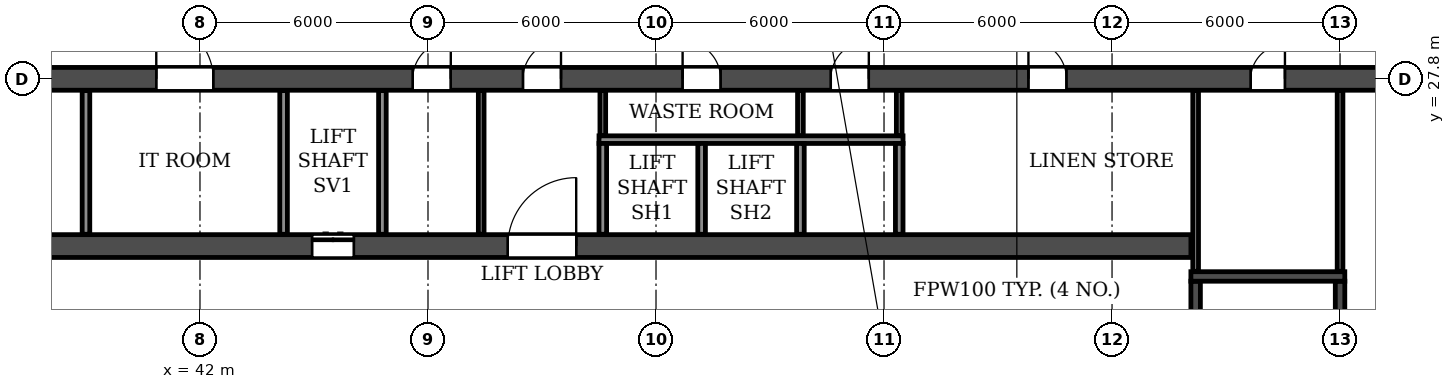
"""IFC4 building model, lengths in metres.
Left out: names, types, materials, properties, quantities, classifications, styles, units other than length and angle.
Written with IfcOpenShell. Run it as: python <this file> out.ifc"""

import sys

from ifc_helpers import new_model, si_unit, direction, frame, frame_2d, origin, place, context, subcontext, project, spatial, rectangle, extrude, element, fill, save


model = new_model("IFC4")
c1 = context("Model", 3, precision=1e-05, world=origin(), true_north=direction((0.0, 1.0)))
c2 = subcontext(c1, "Body", "Model", "MODEL_VIEW")
j1 = project(units=[si_unit("LENGTHUNIT", "METRE"), si_unit("PLANEANGLEUNIT", "RADIAN")], contexts=[c1])
p1 = place(None, origin())
s1 = spatial("IfcSite", under=j1, at=p1, CompositionType="ELEMENT")
p2 = place(p1, origin())
s2 = spatial("IfcBuilding", under=s1, at=p2, CompositionType="ELEMENT")
p3 = place(p2, frame((0.0, 0.0, 43.2)))
s3 = spatial("IfcBuildingStorey", under=s2, at=p3, CompositionType="ELEMENT", Elevation=43.2)
p4 = place(p3, frame((2.6, 27.8, 0.0), z_axis=(0.0, 0.0, 1.0), x_axis=(1.0, 0.0, 0.0)))
e1 = element("IfcWall", 1, at=p4, inside=s3, PredefinedType="SOLIDWALL", context=c2, shape_type="SweptSolid", body=[
    extrude(rectangle(XDim=96.8, YDim=0.6, at=frame_2d((48.4, 0.0))), origin(), (0.0, 0.0, 1.0), 3.05),
])
p5 = place(p4, frame((7.2, 0.0, 0.0)))
e2 = element("IfcOpeningElement", 2, at=p5, cuts=e1, PredefinedType="OPENING", context=c2, shape_type="SweptSolid", body=[
    extrude(rectangle(XDim=1.0, YDim=2.1, at=frame_2d((0.5, 1.05))), frame((0.0, 0.31, 0.0), z_axis=(0.0, -1.0, 0.0), x_axis=(1.0, 0.0, 0.0)), (0.0, 0.0, 1.0), 0.62),
])
p6 = place(p4, frame((16.3, 0.0, 0.0)))
e3 = element("IfcOpeningElement", 3, at=p6, cuts=e1, PredefinedType="OPENING", context=c2, shape_type="SweptSolid", body=[
    extrude(rectangle(XDim=1.0, YDim=2.1, at=frame_2d((0.5, 1.05))), frame((0.0, 0.31, 0.0), z_axis=(0.0, -1.0, 0.0), x_axis=(1.0, 0.0, 0.0)), (0.0, 0.0, 1.0), 0.62),
])
p7 = place(p4, frame((19.65, 0.0, 0.0)))
e4 = element("IfcOpeningElement", 4, at=p7, cuts=e1, PredefinedType="OPENING", context=c2, shape_type="SweptSolid", body=[
    extrude(rectangle(XDim=0.9, YDim=2.1, at=frame_2d((0.45, 1.05))), frame((0.0, 0.31, 0.0), z_axis=(0.0, -1.0, 0.0), x_axis=(1.0, 0.0, 0.0)), (0.0, 0.0, 1.0), 0.62),
])
p8 = place(p4, frame((28.85, 0.0, 0.0)))
e5 = element("IfcOpeningElement", 5, at=p8, cuts=e1, PredefinedType="OPENING", context=c2, shape_type="SweptSolid", body=[
    extrude(rectangle(XDim=0.9, YDim=2.1, at=frame_2d((0.45, 1.05))), frame((0.0, 0.31, 0.0), z_axis=(0.0, -1.0, 0.0), x_axis=(1.0, 0.0, 0.0)), (0.0, 0.0, 1.0), 0.62),
])
p9 = place(p4, frame((33.3, 0.0, 0.0)))
e6 = element("IfcOpeningElement", 6, at=p9, cuts=e1, PredefinedType="OPENING", context=c2, shape_type="SweptSolid", body=[
    extrude(rectangle(XDim=1.0, YDim=2.1, at=frame_2d((0.5, 1.05))), frame((0.0, 0.31, 0.0), z_axis=(0.0, -1.0, 0.0), x_axis=(1.0, 0.0, 0.0)), (0.0, 0.0, 1.0), 0.62),
])
p10 = place(p4, frame((38.25, 0.0, 0.0)))
e7 = element("IfcOpeningElement", 7, at=p10, cuts=e1, PredefinedType="OPENING", context=c2, shape_type="SweptSolid", body=[
    extrude(rectangle(XDim=1.5, YDim=2.1, at=frame_2d((0.75, 1.05))), frame((0.0, 0.31, 0.0), z_axis=(0.0, -1.0, 0.0), x_axis=(1.0, 0.0, 0.0)), (0.0, 0.0, 1.0), 0.62),
])
p11 = place(p4, frame((45.0, 0.0, 0.0)))
e8 = element("IfcOpeningElement", 8, at=p11, cuts=e1, PredefinedType="OPENING", context=c2, shape_type="SweptSolid", body=[
    extrude(rectangle(XDim=1.0, YDim=2.1, at=frame_2d((0.5, 1.05))), frame((0.0, 0.31, 0.0), z_axis=(0.0, -1.0, 0.0), x_axis=(1.0, 0.0, 0.0)), (0.0, 0.0, 1.0), 0.62),
])
p12 = place(p4, frame((47.9, 0.0, 0.0)))
e9 = element("IfcOpeningElement", 9, at=p12, cuts=e1, PredefinedType="OPENING", context=c2, shape_type="SweptSolid", body=[
    extrude(rectangle(XDim=1.0, YDim=2.1, at=frame_2d((0.5, 1.05))), frame((0.0, 0.31, 0.0), z_axis=(0.0, -1.0, 0.0), x_axis=(1.0, 0.0, 0.0)), (0.0, 0.0, 1.0), 0.62),
])
p13 = place(p4, frame((52.1, 0.0, 0.0)))
e10 = element("IfcOpeningElement", 10, at=p13, cuts=e1, PredefinedType="OPENING", context=c2, shape_type="SweptSolid", body=[
    extrude(rectangle(XDim=1.0, YDim=2.1, at=frame_2d((0.5, 1.05))), frame((0.0, 0.31, 0.0), z_axis=(0.0, -1.0, 0.0), x_axis=(1.0, 0.0, 0.0)), (0.0, 0.0, 1.0), 0.62),
])
p14 = place(p4, frame((56.0, 0.0, 0.0)))
e11 = element("IfcOpeningElement", 11, at=p14, cuts=e1, PredefinedType="OPENING", context=c2, shape_type="SweptSolid", body=[
    extrude(rectangle(XDim=1.0, YDim=2.1, at=frame_2d((0.5, 1.05))), frame((0.0, 0.31, 0.0), z_axis=(0.0, -1.0, 0.0), x_axis=(1.0, 0.0, 0.0)), (0.0, 0.0, 1.0), 0.62),
])
p15 = place(p4, frame((61.2, 0.0, 0.0)))
e12 = element("IfcOpeningElement", 12, at=p15, cuts=e1, PredefinedType="OPENING", context=c2, shape_type="SweptSolid", body=[
    extrude(rectangle(XDim=1.0, YDim=2.1, at=frame_2d((0.5, 1.05))), frame((0.0, 0.31, 0.0), z_axis=(0.0, -1.0, 0.0), x_axis=(1.0, 0.0, 0.0)), (0.0, 0.0, 1.0), 0.62),
])
p16 = place(p4, frame((67.05, 0.0, 0.0)))
e13 = element("IfcOpeningElement", 13, at=p16, cuts=e1, PredefinedType="OPENING", context=c2, shape_type="SweptSolid", body=[
    extrude(rectangle(XDim=0.9, YDim=2.1, at=frame_2d((0.45, 1.05))), frame((0.0, 0.31, 0.0), z_axis=(0.0, -1.0, 0.0), x_axis=(1.0, 0.0, 0.0)), (0.0, 0.0, 1.0), 0.62),
])
p17 = place(p4, frame((76.25, 0.0, 0.0)))
e14 = element("IfcOpeningElement", 14, at=p17, cuts=e1, PredefinedType="OPENING", context=c2, shape_type="SweptSolid", body=[
    extrude(rectangle(XDim=0.9, YDim=2.1, at=frame_2d((0.45, 1.05))), frame((0.0, 0.31, 0.0), z_axis=(0.0, -1.0, 0.0), x_axis=(1.0, 0.0, 0.0)), (0.0, 0.0, 1.0), 0.62),
])
p18 = place(p4, frame((79.5, 0.0, 0.0)))
e15 = element("IfcOpeningElement", 15, at=p18, cuts=e1, PredefinedType="OPENING", context=c2, shape_type="SweptSolid", body=[
    extrude(rectangle(XDim=1.0, YDim=2.1, at=frame_2d((0.5, 1.05))), frame((0.0, 0.31, 0.0), z_axis=(0.0, -1.0, 0.0), x_axis=(1.0, 0.0, 0.0)), (0.0, 0.0, 1.0), 0.62),
])
p19 = place(p4, frame((84.05, 0.0, 0.0)))
e16 = element("IfcOpeningElement", 16, at=p19, cuts=e1, PredefinedType="OPENING", context=c2, shape_type="SweptSolid", body=[
    extrude(rectangle(XDim=1.0, YDim=2.1, at=frame_2d((0.5, 1.05))), frame((0.0, 0.31, 0.0), z_axis=(0.0, -1.0, 0.0), x_axis=(1.0, 0.0, 0.0)), (0.0, 0.0, 1.0), 0.62),
])
p20 = place(p4, frame((91.75, 0.0, 0.0)))
e17 = element("IfcOpeningElement", 17, at=p20, cuts=e1, PredefinedType="OPENING", context=c2, shape_type="SweptSolid", body=[
    extrude(rectangle(XDim=1.0, YDim=2.1, at=frame_2d((0.5, 1.05))), frame((0.0, 0.31, 0.0), z_axis=(0.0, -1.0, 0.0), x_axis=(1.0, 0.0, 0.0)), (0.0, 0.0, 1.0), 0.62),
])
p21 = place(p3, frame((33.925, 23.4, 0.0), z_axis=(0.0, 0.0, 1.0), x_axis=(1.0, 0.0, 0.0)))
e18 = element("IfcWall", 18, at=p21, inside=s3, PredefinedType="SOLIDWALL", context=c2, shape_type="SweptSolid", body=[
    extrude(rectangle(XDim=34.15, YDim=0.6, at=frame_2d((17.075, 0.0))), origin(), (0.0, 0.0, 1.0), 3.05),
])
p22 = place(p21, frame((16.175, 0.0, 0.0)))
e19 = element("IfcOpeningElement", 19, at=p22, cuts=e18, PredefinedType="OPENING", context=c2, shape_type="SweptSolid", body=[
    extrude(rectangle(XDim=1.8, YDim=2.1, at=frame_2d((0.9, 1.05))), frame((0.0, 0.31, 0.0), z_axis=(0.0, -1.0, 0.0), x_axis=(1.0, 0.0, 0.0)), (0.0, 0.0, 1.0), 0.62),
])
p23 = place(p21, frame((11.025, 0.0, 0.0)))
e20 = element("IfcOpeningElement", 20, at=p23, cuts=e18, PredefinedType="OPENING", context=c2, shape_type="SweptSolid", body=[
    extrude(rectangle(XDim=1.1, YDim=2.1, at=frame_2d((0.55, 1.05))), frame((0.0, 0.31, 0.0), z_axis=(0.0, -1.0, 0.0), x_axis=(1.0, 0.0, 0.0)), (0.0, 0.0, 1.0), 0.62),
])
p24 = place(p3, frame((68.2, 14.9, 0.0), z_axis=(0.0, 0.0, 1.0), x_axis=(0.0, 1.0, 0.0)))
e21 = element("IfcWall", 21, at=p24, inside=s3, PredefinedType="SOLIDWALL", context=c2, shape_type="SweptSolid", body=[
    extrude(rectangle(XDim=7.575, YDim=0.25, at=frame_2d((3.788, 0.0))), origin(), (0.0, 0.0, 1.0), 3.05),
])
p25 = place(p24, frame((0.4, 0.0, 0.0)))
e22 = element("IfcOpeningElement", 22, at=p25, cuts=e21, PredefinedType="OPENING", context=c2, shape_type="SweptSolid", body=[
    extrude(rectangle(XDim=1.0, YDim=2.1, at=frame_2d((0.5, 1.05))), frame((0.0, 0.135, 0.0), z_axis=(0.0, -1.0, 0.0), x_axis=(1.0, 0.0, 0.0)), (0.0, 0.0, 1.0), 0.27),
])
p26 = place(p3, frame((72.0, 14.9, 0.0), z_axis=(0.0, 0.0, 1.0), x_axis=(0.0, 1.0, 0.0)))
e23 = element("IfcWall", 23, at=p26, inside=s3, PredefinedType="SOLIDWALL", context=c2, shape_type="SweptSolid", body=[
    extrude(rectangle(XDim=7.575, YDim=0.25, at=frame_2d((3.788, 0.0))), origin(), (0.0, 0.0, 1.0), 3.05),
])
p27 = place(p3, frame((68.075, 22.6, 0.0), z_axis=(0.0, 0.0, 1.0), x_axis=(1.0, 0.0, 0.0)))
e24 = element("IfcWall", 24, at=p27, inside=s3, PredefinedType="SOLIDWALL", context=c2, shape_type="SweptSolid", body=[
    extrude(rectangle(XDim=4.05, YDim=0.25, at=frame_2d((2.025, 0.0))), origin(), (0.0, 0.0, 1.0), 3.05),
])
p28 = place(p3, frame((49.4, 23.71, 0.0), z_axis=(0.0, 0.0, 1.0), x_axis=(0.0, 1.0, 0.0)))
e25 = element("IfcWall", 25, at=p28, inside=s3, PredefinedType="PARTITIONING", context=c2, shape_type="SweptSolid", body=[
    extrude(rectangle(XDim=3.78, YDim=0.15, at=frame_2d((1.89, 0.0))), origin(), (0.0, 0.0, 1.0), 3.05),
])
for number, where, z_axis, x_axis in (
    (26, (52.6, 26.3, 0.0), (0.0, 0.0, 1.0), (0.0, 1.0, 0.0)),
    (27, (57.8, 26.3, 0.0), (0.0, 0.0, 1.0), (0.0, 1.0, 0.0)),
    (28, (60.4, 26.3, 0.0), (0.0, 0.0, 1.0), (0.0, 1.0, 0.0)),
):
    element("IfcWall", number, at=place(p3, frame(where, z_axis=z_axis, x_axis=x_axis)), inside=s3, PredefinedType="PARTITIONING", context=c2, shape_type="SweptSolid", body=[
        extrude(rectangle(XDim=1.19, YDim=0.15, at=frame_2d((0.595, 0.0))), origin(), (0.0, 0.0, 1.0), 3.05),
    ])
p29 = place(p3, frame((39.0, 23.71, 0.0), z_axis=(0.0, 0.0, 1.0), x_axis=(0.0, 1.0, 0.0)))
e29 = element("IfcWall", 29, at=p29, inside=s3, PredefinedType="PARTITIONING", context=c2, shape_type="SweptSolid", body=[
    extrude(rectangle(XDim=3.78, YDim=0.2, at=frame_2d((1.89, 0.0))), origin(), (0.0, 0.0, 1.0), 3.05),
])
for number, where, z_axis, x_axis in (
    (30, (68.2, 22.735, 0.0), (0.0, 0.0, 1.0), (0.0, 1.0, 0.0)),
    (31, (72.0, 22.735, 0.0), (0.0, 0.0, 1.0), (0.0, 1.0, 0.0)),
):
    element("IfcWall", number, at=place(p3, frame(where, z_axis=z_axis, x_axis=x_axis)), inside=s3, PredefinedType="PARTITIONING", context=c2, shape_type="SweptSolid", body=[
        extrude(rectangle(XDim=4.755, YDim=0.15, at=frame_2d((2.377, 0.0))), origin(), (0.0, 0.0, 1.0), 3.05),
    ])
p30 = place(p3, frame((52.5, 26.2, 0.0), z_axis=(0.0, 0.0, 1.0), x_axis=(1.0, 0.0, 0.0)))
e32 = element("IfcWall", 32, at=p30, inside=s3, PredefinedType="PARTITIONING", context=c2, shape_type="SweptSolid", body=[
    extrude(rectangle(XDim=8.0, YDim=0.2, at=frame_2d((4.0, 0.0))), origin(), (0.0, 0.0, 1.0), 3.05),
])
for number, where, z_axis, x_axis in (
    (33, (44.2, 23.71, 0.0), (0.0, 0.0, 1.0), (0.0, 1.0, 0.0)),
    (34, (46.8, 23.71, 0.0), (0.0, 0.0, 1.0), (0.0, 1.0, 0.0)),
):
    element("IfcWall", number, at=place(p3, frame(where, z_axis=z_axis, x_axis=x_axis)), inside=s3, PredefinedType="PARTITIONING", context=c2, shape_type="SweptSolid", body=[
        extrude(rectangle(XDim=3.78, YDim=0.2, at=frame_2d((1.89, 0.0))), origin(), (0.0, 0.0, 1.0), 3.05),
    ])
for number, where, z_axis, x_axis in (
    (35, (52.6, 23.71, 0.0), (0.0, 0.0, 1.0), (0.0, 1.0, 0.0)),
    (36, (55.2, 23.71, 0.0), (0.0, 0.0, 1.0), (0.0, 1.0, 0.0)),
    (37, (57.8, 23.71, 0.0), (0.0, 0.0, 1.0), (0.0, 1.0, 0.0)),
    (38, (60.4, 23.71, 0.0), (0.0, 0.0, 1.0), (0.0, 1.0, 0.0)),
):
    element("IfcWall", number, at=place(p3, frame(where, z_axis=z_axis, x_axis=x_axis)), inside=s3, PredefinedType="PARTITIONING", context=c2, shape_type="SweptSolid", body=[
        extrude(rectangle(XDim=2.39, YDim=0.2, at=frame_2d((1.195, 0.0))), origin(), (0.0, 0.0, 1.0), 3.05),
    ])
p31 = place(p10, origin())
e39 = element("IfcDoor", 39, at=p31, inside=s3, OperationType="DOUBLE_DOOR_SINGLE_SWING", PredefinedType="DOOR", context=c2, shape_type="SweptSolid", body=[
    extrude(rectangle(XDim=1.5, YDim=2.1, at=frame_2d((0.75, 1.05))), frame((0.0, 0.025, 0.0), z_axis=(0.0, -1.0, 0.0), x_axis=(1.0, 0.0, 0.0)), (0.0, 0.0, 1.0), 0.05),
])
fill(e7, e39)
p32 = place(p11, origin())
e40 = element("IfcDoor", 40, at=p32, inside=s3, OperationType="SINGLE_SWING_RIGHT", PredefinedType="DOOR", context=c2, shape_type="SweptSolid", body=[
    extrude(rectangle(XDim=1.0, YDim=2.1, at=frame_2d((0.5, 1.05))), frame((0.0, 0.025, 0.0), z_axis=(0.0, -1.0, 0.0), x_axis=(1.0, 0.0, 0.0)), (0.0, 0.0, 1.0), 0.05),
])
fill(e8, e40)
p33 = place(p12, origin())
e41 = element("IfcDoor", 41, at=p33, inside=s3, OperationType="SINGLE_SWING_RIGHT", PredefinedType="DOOR", context=c2, shape_type="SweptSolid", body=[
    extrude(rectangle(XDim=1.0, YDim=2.1, at=frame_2d((0.5, 1.05))), frame((0.0, 0.025, 0.0), z_axis=(0.0, -1.0, 0.0), x_axis=(1.0, 0.0, 0.0)), (0.0, 0.0, 1.0), 0.05),
])
fill(e9, e41)
p34 = place(p13, origin())
e42 = element("IfcDoor", 42, at=p34, inside=s3, OperationType="SINGLE_SWING_LEFT", PredefinedType="DOOR", context=c2, shape_type="SweptSolid", body=[
    extrude(rectangle(XDim=1.0, YDim=2.1, at=frame_2d((0.5, 1.05))), frame((0.0, 0.025, 0.0), z_axis=(0.0, -1.0, 0.0), x_axis=(1.0, 0.0, 0.0)), (0.0, 0.0, 1.0), 0.05),
])
fill(e10, e42)
p35 = place(p14, origin())
e43 = element("IfcDoor", 43, at=p35, inside=s3, OperationType="SINGLE_SWING_RIGHT", PredefinedType="DOOR", context=c2, shape_type="SweptSolid", body=[
    extrude(rectangle(XDim=1.0, YDim=2.1, at=frame_2d((0.5, 1.05))), frame((0.0, 0.025, 0.0), z_axis=(0.0, -1.0, 0.0), x_axis=(1.0, 0.0, 0.0)), (0.0, 0.0, 1.0), 0.05),
])
fill(e11, e43)
p36 = place(p15, origin())
e44 = element("IfcDoor", 44, at=p36, inside=s3, OperationType="SINGLE_SWING_LEFT", PredefinedType="DOOR", context=c2, shape_type="SweptSolid", body=[
    extrude(rectangle(XDim=1.0, YDim=2.1, at=frame_2d((0.5, 1.05))), frame((0.0, 0.025, 0.0), z_axis=(0.0, -1.0, 0.0), x_axis=(1.0, 0.0, 0.0)), (0.0, 0.0, 1.0), 0.05),
])
fill(e12, e44)
p37 = place(p16, origin())
e45 = element("IfcDoor", 45, at=p37, inside=s3, OperationType="SINGLE_SWING_RIGHT", PredefinedType="DOOR", context=c2, shape_type="SweptSolid", body=[
    extrude(rectangle(XDim=0.9, YDim=2.1, at=frame_2d((0.45, 1.05))), frame((0.0, 0.025, 0.0), z_axis=(0.0, -1.0, 0.0), x_axis=(1.0, 0.0, 0.0)), (0.0, 0.0, 1.0), 0.05),
])
fill(e13, e45)
p38 = place(p22, origin())
e46 = element("IfcDoor", 46, at=p38, inside=s3, OperationType="DOUBLE_DOOR_SINGLE_SWING", PredefinedType="DOOR", context=c2, shape_type="SweptSolid", body=[
    extrude(rectangle(XDim=1.8, YDim=2.1, at=frame_2d((0.9, 1.05))), frame((0.0, 0.025, 0.0), z_axis=(0.0, -1.0, 0.0), x_axis=(1.0, 0.0, 0.0)), (0.0, 0.0, 1.0), 0.05),
])
fill(e19, e46)
p39 = place(p23, origin())
e47 = element("IfcDoor", 47, at=p39, inside=s3, OperationType="DOUBLE_DOOR_SLIDING", PredefinedType="DOOR", context=c2, shape_type="SweptSolid", body=[
    extrude(rectangle(XDim=1.1, YDim=2.1, at=frame_2d((0.55, 1.05))), frame((0.0, 0.025, 0.0), z_axis=(0.0, -1.0, 0.0), x_axis=(1.0, 0.0, 0.0)), (0.0, 0.0, 1.0), 0.05),
])
fill(e20, e47)
save(model, sys.argv[1])
